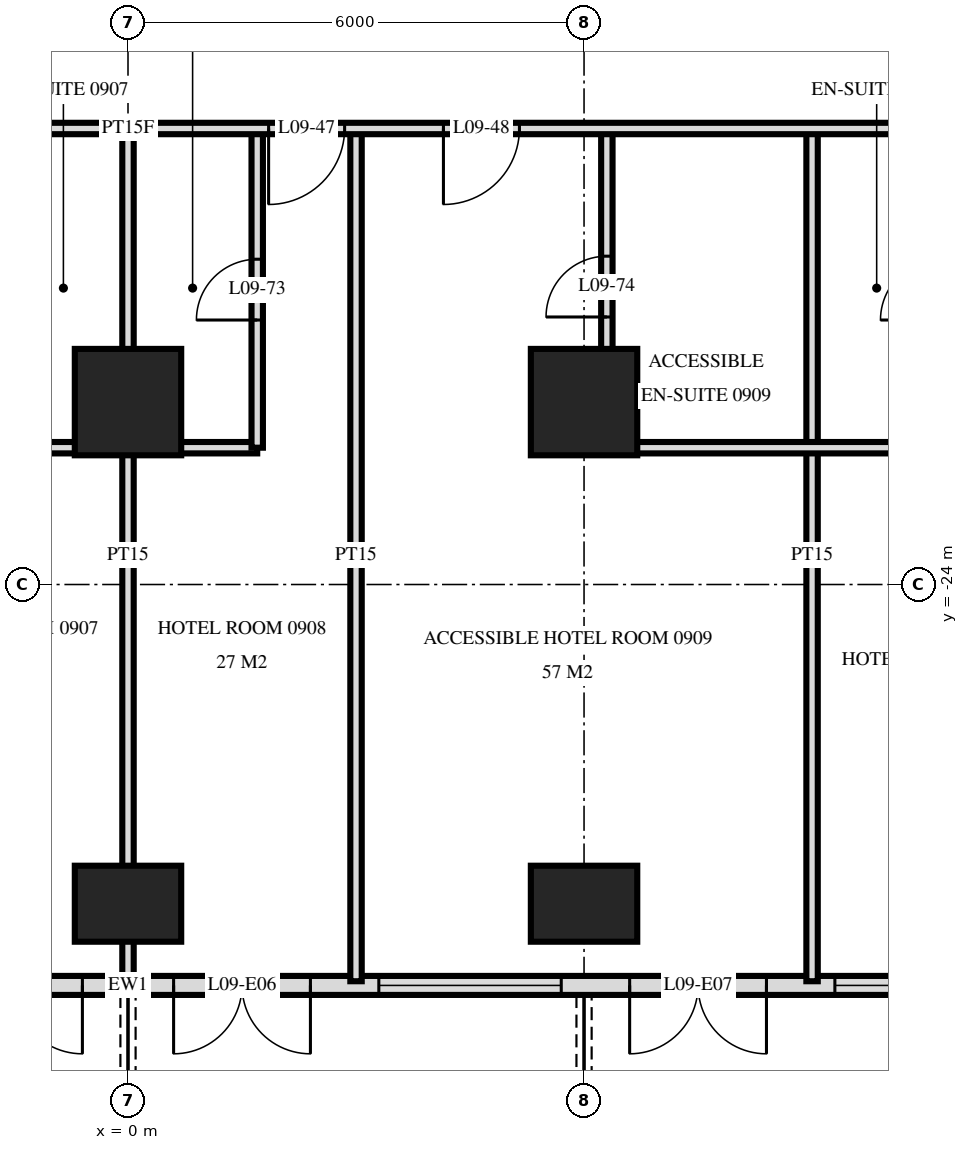
"""IFC4 building model, lengths in metres.
Left out: names, types, materials, properties, quantities, classifications, styles, units other than length and angle.
Written with IfcOpenShell. Run it as: python <this file> out.ifc"""

import sys

from ifc_helpers import new_model, si_unit, direction, frame, frame_2d, origin, origin_2d, place, context, subcontext, project, spatial, rectangle, extrude, element, fill, save


model = new_model("IFC4")
c1 = context("Model", 3, precision=1e-05, world=origin(), true_north=direction((0.0, 1.0)))
c2 = subcontext(c1, "Body", "Model", "MODEL_VIEW")
j1 = project(units=[si_unit("LENGTHUNIT", "METRE"), si_unit("PLANEANGLEUNIT", "RADIAN")], contexts=[c1])
p1 = place(None, origin())
s1 = spatial("IfcSite", under=j1, at=p1, CompositionType="ELEMENT")
p2 = place(p1, origin())
s2 = spatial("IfcBuilding", under=s1, at=p2, CompositionType="ELEMENT")
p3 = place(p2, frame((0.0, 0.0, 42.0)))
s3 = spatial("IfcBuildingStorey", under=s2, at=p3, CompositionType="ELEMENT", Elevation=42.0)
p4 = place(p3, frame((0.0, -28.2, 0.0), z_axis=(0.0, 0.0, 1.0), x_axis=(1.0, 0.0, 0.0)))
e1 = element("IfcColumn", 1, at=p4, inside=s3, PredefinedType="COLUMN", context=c2, shape_type="SweptSolid", body=[
    extrude(rectangle(XDim=1.4, YDim=1.0, at=origin_2d()), origin(), (0.0, 0.0, 1.0), 3.6),
])
p5 = place(p3, frame((0.0, -21.6, 0.0), z_axis=(0.0, 0.0, 1.0), x_axis=(1.0, 0.0, 0.0)))
e2 = element("IfcColumn", 2, at=p5, inside=s3, PredefinedType="COLUMN", context=c2, shape_type="SweptSolid", body=[
    extrude(rectangle(XDim=1.4, YDim=1.4, at=origin_2d()), origin(), (0.0, 0.0, 1.0), 3.6),
])
p6 = place(p3, frame((6.0, -28.2, 0.0), z_axis=(0.0, 0.0, 1.0), x_axis=(1.0, 0.0, 0.0)))
e3 = element("IfcColumn", 3, at=p6, inside=s3, PredefinedType="COLUMN", context=c2, shape_type="SweptSolid", body=[
    extrude(rectangle(XDim=1.4, YDim=1.0, at=origin_2d()), origin(), (0.0, 0.0, 1.0), 3.6),
])
p7 = place(p3, frame((6.0, -21.6, 0.0), z_axis=(0.0, 0.0, 1.0), x_axis=(1.0, 0.0, 0.0)))
e4 = element("IfcColumn", 4, at=p7, inside=s3, PredefinedType="COLUMN", context=c2, shape_type="SweptSolid", body=[
    extrude(rectangle(XDim=1.4, YDim=1.4, at=origin_2d()), origin(), (0.0, 0.0, 1.0), 3.6),
])
p8 = place(p3, frame((-28.775, -29.275, 0.0), z_axis=(0.0, 0.0, 1.0), x_axis=(1.0, 0.0, 0.0)))
e5 = element("IfcWall", 5, at=p8, inside=s3, PredefinedType="SOLIDWALL", context=c2, shape_type="SweptSolid", body=[
    extrude(rectangle(XDim=57.551, YDim=0.25, at=frame_2d((28.775, 0.0))), origin(), (0.0, 0.0, 1.0), 3.32),
])
p9 = place(p8, frame((0.575, 0.0, 0.0)))
e6 = element("IfcOpeningElement", 6, at=p9, cuts=e5, PredefinedType="OPENING", context=c2, shape_type="SweptSolid", body=[
    extrude(rectangle(XDim=1.8, YDim=2.4, at=frame_2d((0.9, 1.2))), frame((0.0, 0.135, 0.0), z_axis=(0.0, -1.0, 0.0), x_axis=(1.0, 0.0, 0.0)), (0.0, 0.0, 1.0), 0.27),
])
p10 = place(p8, frame((5.375, 0.0, 0.0)))
e7 = element("IfcOpeningElement", 7, at=p10, cuts=e5, PredefinedType="OPENING", context=c2, shape_type="SweptSolid", body=[
    extrude(rectangle(XDim=1.8, YDim=2.4, at=frame_2d((0.9, 1.2))), frame((0.0, 0.135, 0.0), z_axis=(0.0, -1.0, 0.0), x_axis=(1.0, 0.0, 0.0)), (0.0, 0.0, 1.0), 0.27),
])
p11 = place(p8, frame((8.075, 0.0, 0.3)))
e8 = element("IfcOpeningElement", 8, at=p11, cuts=e5, PredefinedType="OPENING", context=c2, shape_type="SweptSolid", body=[
    extrude(rectangle(XDim=2.4, YDim=2.1, at=frame_2d((1.2, 1.05))), frame((0.0, 0.135, 0.0), z_axis=(0.0, -1.0, 0.0), x_axis=(1.0, 0.0, 0.0)), (0.0, 0.0, 1.0), 0.27),
])
p12 = place(p8, frame((11.375, 0.0, 0.0)))
e9 = element("IfcOpeningElement", 9, at=p12, cuts=e5, PredefinedType="OPENING", context=c2, shape_type="SweptSolid", body=[
    extrude(rectangle(XDim=1.8, YDim=2.4, at=frame_2d((0.9, 1.2))), frame((0.0, 0.135, 0.0), z_axis=(0.0, -1.0, 0.0), x_axis=(1.0, 0.0, 0.0)), (0.0, 0.0, 1.0), 0.27),
])
p13 = place(p8, frame((14.075, 0.0, 0.3)))
e10 = element("IfcOpeningElement", 10, at=p13, cuts=e5, PredefinedType="OPENING", context=c2, shape_type="SweptSolid", body=[
    extrude(rectangle(XDim=2.4, YDim=2.1, at=frame_2d((1.2, 1.05))), frame((0.0, 0.135, 0.0), z_axis=(0.0, -1.0, 0.0), x_axis=(1.0, 0.0, 0.0)), (0.0, 0.0, 1.0), 0.27),
])
p14 = place(p8, frame((17.375, 0.0, 0.0)))
e11 = element("IfcOpeningElement", 11, at=p14, cuts=e5, PredefinedType="OPENING", context=c2, shape_type="SweptSolid", body=[
    extrude(rectangle(XDim=1.8, YDim=2.4, at=frame_2d((0.9, 1.2))), frame((0.0, 0.135, 0.0), z_axis=(0.0, -1.0, 0.0), x_axis=(1.0, 0.0, 0.0)), (0.0, 0.0, 1.0), 0.27),
])
p15 = place(p8, frame((20.075, 0.0, 0.3)))
e12 = element("IfcOpeningElement", 12, at=p15, cuts=e5, PredefinedType="OPENING", context=c2, shape_type="SweptSolid", body=[
    extrude(rectangle(XDim=2.4, YDim=2.1, at=frame_2d((1.2, 1.05))), frame((0.0, 0.135, 0.0), z_axis=(0.0, -1.0, 0.0), x_axis=(1.0, 0.0, 0.0)), (0.0, 0.0, 1.0), 0.27),
])
p16 = place(p8, frame((23.075, 0.0, 0.3)))
e13 = element("IfcOpeningElement", 13, at=p16, cuts=e5, PredefinedType="OPENING", context=c2, shape_type="SweptSolid", body=[
    extrude(rectangle(XDim=2.4, YDim=2.1, at=frame_2d((1.2, 1.05))), frame((0.0, 0.135, 0.0), z_axis=(0.0, -1.0, 0.0), x_axis=(1.0, 0.0, 0.0)), (0.0, 0.0, 1.0), 0.27),
])
p17 = place(p8, frame((26.375, 0.0, 0.0)))
e14 = element("IfcOpeningElement", 14, at=p17, cuts=e5, PredefinedType="OPENING", context=c2, shape_type="SweptSolid", body=[
    extrude(rectangle(XDim=1.8, YDim=2.4, at=frame_2d((0.9, 1.2))), frame((0.0, 0.135, 0.0), z_axis=(0.0, -1.0, 0.0), x_axis=(1.0, 0.0, 0.0)), (0.0, 0.0, 1.0), 0.27),
])
p18 = place(p8, frame((29.375, 0.0, 0.0)))
e15 = element("IfcOpeningElement", 15, at=p18, cuts=e5, PredefinedType="OPENING", context=c2, shape_type="SweptSolid", body=[
    extrude(rectangle(XDim=1.8, YDim=2.4, at=frame_2d((0.9, 1.2))), frame((0.0, 0.135, 0.0), z_axis=(0.0, -1.0, 0.0), x_axis=(1.0, 0.0, 0.0)), (0.0, 0.0, 1.0), 0.27),
])
p19 = place(p8, frame((32.075, 0.0, 0.3)))
e16 = element("IfcOpeningElement", 16, at=p19, cuts=e5, PredefinedType="OPENING", context=c2, shape_type="SweptSolid", body=[
    extrude(rectangle(XDim=2.4, YDim=2.1, at=frame_2d((1.2, 1.05))), frame((0.0, 0.135, 0.0), z_axis=(0.0, -1.0, 0.0), x_axis=(1.0, 0.0, 0.0)), (0.0, 0.0, 1.0), 0.27),
])
p20 = place(p8, frame((35.375, 0.0, 0.0)))
e17 = element("IfcOpeningElement", 17, at=p20, cuts=e5, PredefinedType="OPENING", context=c2, shape_type="SweptSolid", body=[
    extrude(rectangle(XDim=1.8, YDim=2.4, at=frame_2d((0.9, 1.2))), frame((0.0, 0.135, 0.0), z_axis=(0.0, -1.0, 0.0), x_axis=(1.0, 0.0, 0.0)), (0.0, 0.0, 1.0), 0.27),
])
p21 = place(p8, frame((38.075, 0.0, 0.3)))
e18 = element("IfcOpeningElement", 18, at=p21, cuts=e5, PredefinedType="OPENING", context=c2, shape_type="SweptSolid", body=[
    extrude(rectangle(XDim=2.4, YDim=2.1, at=frame_2d((1.2, 1.05))), frame((0.0, 0.135, 0.0), z_axis=(0.0, -1.0, 0.0), x_axis=(1.0, 0.0, 0.0)), (0.0, 0.0, 1.0), 0.27),
])
p22 = place(p8, frame((41.375, 0.0, 0.0)))
e19 = element("IfcOpeningElement", 19, at=p22, cuts=e5, PredefinedType="OPENING", context=c2, shape_type="SweptSolid", body=[
    extrude(rectangle(XDim=1.8, YDim=2.4, at=frame_2d((0.9, 1.2))), frame((0.0, 0.135, 0.0), z_axis=(0.0, -1.0, 0.0), x_axis=(1.0, 0.0, 0.0)), (0.0, 0.0, 1.0), 0.27),
])
p23 = place(p8, frame((44.075, 0.0, 0.3)))
e20 = element("IfcOpeningElement", 20, at=p23, cuts=e5, PredefinedType="OPENING", context=c2, shape_type="SweptSolid", body=[
    extrude(rectangle(XDim=2.4, YDim=2.1, at=frame_2d((1.2, 1.05))), frame((0.0, 0.135, 0.0), z_axis=(0.0, -1.0, 0.0), x_axis=(1.0, 0.0, 0.0)), (0.0, 0.0, 1.0), 0.27),
])
p24 = place(p8, frame((47.375, 0.0, 0.0)))
e21 = element("IfcOpeningElement", 21, at=p24, cuts=e5, PredefinedType="OPENING", context=c2, shape_type="SweptSolid", body=[
    extrude(rectangle(XDim=1.8, YDim=2.4, at=frame_2d((0.9, 1.2))), frame((0.0, 0.135, 0.0), z_axis=(0.0, -1.0, 0.0), x_axis=(1.0, 0.0, 0.0)), (0.0, 0.0, 1.0), 0.27),
])
p25 = place(p8, frame((50.075, 0.0, 0.3)))
e22 = element("IfcOpeningElement", 22, at=p25, cuts=e5, PredefinedType="OPENING", context=c2, shape_type="SweptSolid", body=[
    extrude(rectangle(XDim=2.4, YDim=2.1, at=frame_2d((1.2, 1.05))), frame((0.0, 0.135, 0.0), z_axis=(0.0, -1.0, 0.0), x_axis=(1.0, 0.0, 0.0)), (0.0, 0.0, 1.0), 0.27),
])
p26 = place(p8, frame((53.375, 0.0, 0.0)))
e23 = element("IfcOpeningElement", 23, at=p26, cuts=e5, PredefinedType="OPENING", context=c2, shape_type="SweptSolid", body=[
    extrude(rectangle(XDim=1.8, YDim=2.4, at=frame_2d((0.9, 1.2))), frame((0.0, 0.135, 0.0), z_axis=(0.0, -1.0, 0.0), x_axis=(1.0, 0.0, 0.0)), (0.0, 0.0, 1.0), 0.27),
])
p27 = place(p3, frame((9.0, -29.22, 0.0), z_axis=(0.0, 0.0, 1.0), x_axis=(0.0, 1.0, 0.0)))
e24 = element("IfcWall", 24, at=p27, inside=s3, PredefinedType="PARTITIONING", context=c2, shape_type="SweptSolid", body=[
    extrude(rectangle(XDim=11.22, YDim=0.15, at=frame_2d((5.61, 0.0))), origin(), (0.0, 0.0, 1.0), 3.32),
])
p28 = place(p3, frame((6.3, -22.2, 0.0), z_axis=(0.0, 0.0, 1.0), x_axis=(0.0, 1.0, 0.0)))
e25 = element("IfcWall", 25, at=p28, inside=s3, PredefinedType="PARTITIONING", context=c2, shape_type="SweptSolid", body=[
    extrude(rectangle(XDim=4.2, YDim=0.15, at=frame_2d((2.1, 0.0))), origin(), (0.0, 0.0, 1.0), 3.32),
])
p29 = place(p28, frame((1.72, 0.0, 0.0)))
e26 = element("IfcOpeningElement", 26, at=p29, cuts=e25, PredefinedType="OPENING", context=c2, shape_type="SweptSolid", body=[
    extrude(rectangle(XDim=0.8, YDim=2.1, at=frame_2d((0.4, 1.05))), frame((0.0, 0.085, 0.0), z_axis=(0.0, -1.0, 0.0), x_axis=(1.0, 0.0, 0.0)), (0.0, 0.0, 1.0), 0.17),
])
p30 = place(p3, frame((3.0, -29.22, 0.0), z_axis=(0.0, 0.0, 1.0), x_axis=(0.0, 1.0, 0.0)))
e27 = element("IfcWall", 27, at=p30, inside=s3, PredefinedType="PARTITIONING", context=c2, shape_type="SweptSolid", body=[
    extrude(rectangle(XDim=11.22, YDim=0.15, at=frame_2d((5.61, 0.0))), origin(), (0.0, 0.0, 1.0), 3.32),
])
p31 = place(p3, frame((1.7, -22.2, 0.0), z_axis=(0.0, 0.0, 1.0), x_axis=(0.0, 1.0, 0.0)))
e28 = element("IfcWall", 28, at=p31, inside=s3, PredefinedType="PARTITIONING", context=c2, shape_type="SweptSolid", body=[
    extrude(rectangle(XDim=4.2, YDim=0.15, at=frame_2d((2.1, 0.0))), origin(), (0.0, 0.0, 1.0), 3.32),
])
p32 = place(p31, frame((1.68, 0.0, 0.0)))
e29 = element("IfcOpeningElement", 29, at=p32, cuts=e28, PredefinedType="OPENING", context=c2, shape_type="SweptSolid", body=[
    extrude(rectangle(XDim=0.8, YDim=2.1, at=frame_2d((0.4, 1.05))), frame((0.0, 0.085, 0.0), z_axis=(0.0, -1.0, 0.0), x_axis=(1.0, 0.0, 0.0)), (0.0, 0.0, 1.0), 0.17),
])
p33 = place(p3, frame((0.0, -29.22, 0.0), z_axis=(0.0, 0.0, 1.0), x_axis=(0.0, 1.0, 0.0)))
e30 = element("IfcWall", 30, at=p33, inside=s3, PredefinedType="PARTITIONING", context=c2, shape_type="SweptSolid", body=[
    extrude(rectangle(XDim=11.22, YDim=0.15, at=frame_2d((5.61, 0.0))), origin(), (0.0, 0.0, 1.0), 3.32),
])
p34 = place(p3, frame((-1.7, -22.2, 0.0), z_axis=(0.0, 0.0, 1.0), x_axis=(1.0, 0.0, 0.0)))
e31 = element("IfcWall", 31, at=p34, inside=s3, PredefinedType="PARTITIONING", context=c2, shape_type="SweptSolid", body=[
    extrude(rectangle(XDim=3.4, YDim=0.15, at=frame_2d((1.7, 0.0))), origin(), (0.0, 0.0, 1.0), 3.32),
])
p35 = place(p3, frame((6.3, -22.2, 0.0), z_axis=(0.0, 0.0, 1.0), x_axis=(1.0, 0.0, 0.0)))
e32 = element("IfcWall", 32, at=p35, inside=s3, PredefinedType="PARTITIONING", context=c2, shape_type="SweptSolid", body=[
    extrude(rectangle(XDim=4.4, YDim=0.15, at=frame_2d((2.2, 0.0))), origin(), (0.0, 0.0, 1.0), 3.32),
])
p36 = place(p3, frame((-33.12, -18.0, 0.0), z_axis=(0.0, 0.0, 1.0), x_axis=(1.0, 0.0, 0.0)))
e33 = element("IfcWall", 33, at=p36, inside=s3, PredefinedType="PARTITIONING", context=c2, shape_type="SweptSolid", body=[
    extrude(rectangle(XDim=66.24, YDim=0.15, at=frame_2d((33.12, 0.0))), origin(), (0.0, 0.0, 1.0), 3.32),
])
p37 = place(p36, frame((12.27, 0.0, 0.0)))
e34 = element("IfcOpeningElement", 34, at=p37, cuts=e33, PredefinedType="OPENING", context=c2, shape_type="SweptSolid", body=[
    extrude(rectangle(XDim=1.0, YDim=2.1, at=frame_2d((0.5, 1.05))), frame((0.0, 0.085, 0.0), z_axis=(0.0, -1.0, 0.0), x_axis=(1.0, 0.0, 0.0)), (0.0, 0.0, 1.0), 0.17),
])
p38 = place(p36, frame((16.97, 0.0, 0.0)))
e35 = element("IfcOpeningElement", 35, at=p38, cuts=e33, PredefinedType="OPENING", context=c2, shape_type="SweptSolid", body=[
    extrude(rectangle(XDim=1.0, YDim=2.1, at=frame_2d((0.5, 1.05))), frame((0.0, 0.085, 0.0), z_axis=(0.0, -1.0, 0.0), x_axis=(1.0, 0.0, 0.0)), (0.0, 0.0, 1.0), 0.17),
])
p39 = place(p36, frame((18.27, 0.0, 0.0)))
e36 = element("IfcOpeningElement", 36, at=p39, cuts=e33, PredefinedType="OPENING", context=c2, shape_type="SweptSolid", body=[
    extrude(rectangle(XDim=1.0, YDim=2.1, at=frame_2d((0.5, 1.05))), frame((0.0, 0.085, 0.0), z_axis=(0.0, -1.0, 0.0), x_axis=(1.0, 0.0, 0.0)), (0.0, 0.0, 1.0), 0.17),
])
p40 = place(p36, frame((22.97, 0.0, 0.0)))
e37 = element("IfcOpeningElement", 37, at=p40, cuts=e33, PredefinedType="OPENING", context=c2, shape_type="SweptSolid", body=[
    extrude(rectangle(XDim=1.0, YDim=2.1, at=frame_2d((0.5, 1.05))), frame((0.0, 0.085, 0.0), z_axis=(0.0, -1.0, 0.0), x_axis=(1.0, 0.0, 0.0)), (0.0, 0.0, 1.0), 0.17),
])
p41 = place(p36, frame((24.27, 0.0, 0.0)))
e38 = element("IfcOpeningElement", 38, at=p41, cuts=e33, PredefinedType="OPENING", context=c2, shape_type="SweptSolid", body=[
    extrude(rectangle(XDim=1.0, YDim=2.1, at=frame_2d((0.5, 1.05))), frame((0.0, 0.085, 0.0), z_axis=(0.0, -1.0, 0.0), x_axis=(1.0, 0.0, 0.0)), (0.0, 0.0, 1.0), 0.17),
])
p42 = place(p36, frame((28.97, 0.0, 0.0)))
e39 = element("IfcOpeningElement", 39, at=p42, cuts=e33, PredefinedType="OPENING", context=c2, shape_type="SweptSolid", body=[
    extrude(rectangle(XDim=1.0, YDim=2.1, at=frame_2d((0.5, 1.05))), frame((0.0, 0.085, 0.0), z_axis=(0.0, -1.0, 0.0), x_axis=(1.0, 0.0, 0.0)), (0.0, 0.0, 1.0), 0.17),
])
p43 = place(p36, frame((30.27, 0.0, 0.0)))
e40 = element("IfcOpeningElement", 40, at=p43, cuts=e33, PredefinedType="OPENING", context=c2, shape_type="SweptSolid", body=[
    extrude(rectangle(XDim=1.0, YDim=2.1, at=frame_2d((0.5, 1.05))), frame((0.0, 0.085, 0.0), z_axis=(0.0, -1.0, 0.0), x_axis=(1.0, 0.0, 0.0)), (0.0, 0.0, 1.0), 0.17),
])
p44 = place(p36, frame((34.97, 0.0, 0.0)))
e41 = element("IfcOpeningElement", 41, at=p44, cuts=e33, PredefinedType="OPENING", context=c2, shape_type="SweptSolid", body=[
    extrude(rectangle(XDim=1.0, YDim=2.1, at=frame_2d((0.5, 1.05))), frame((0.0, 0.085, 0.0), z_axis=(0.0, -1.0, 0.0), x_axis=(1.0, 0.0, 0.0)), (0.0, 0.0, 1.0), 0.17),
])
p45 = place(p36, frame((37.27, 0.0, 0.0)))
e42 = element("IfcOpeningElement", 42, at=p45, cuts=e33, PredefinedType="OPENING", context=c2, shape_type="SweptSolid", body=[
    extrude(rectangle(XDim=1.0, YDim=2.1, at=frame_2d((0.5, 1.05))), frame((0.0, 0.085, 0.0), z_axis=(0.0, -1.0, 0.0), x_axis=(1.0, 0.0, 0.0)), (0.0, 0.0, 1.0), 0.17),
])
p46 = place(p36, frame((43.97, 0.0, 0.0)))
e43 = element("IfcOpeningElement", 43, at=p46, cuts=e33, PredefinedType="OPENING", context=c2, shape_type="SweptSolid", body=[
    extrude(rectangle(XDim=1.0, YDim=2.1, at=frame_2d((0.5, 1.05))), frame((0.0, 0.085, 0.0), z_axis=(0.0, -1.0, 0.0), x_axis=(1.0, 0.0, 0.0)), (0.0, 0.0, 1.0), 0.17),
])
p47 = place(p36, frame((45.27, 0.0, 0.0)))
e44 = element("IfcOpeningElement", 44, at=p47, cuts=e33, PredefinedType="OPENING", context=c2, shape_type="SweptSolid", body=[
    extrude(rectangle(XDim=1.0, YDim=2.1, at=frame_2d((0.5, 1.05))), frame((0.0, 0.085, 0.0), z_axis=(0.0, -1.0, 0.0), x_axis=(1.0, 0.0, 0.0)), (0.0, 0.0, 1.0), 0.17),
])
p48 = place(p36, frame((51.22, 0.0, 0.0)))
e45 = element("IfcOpeningElement", 45, at=p48, cuts=e33, PredefinedType="OPENING", context=c2, shape_type="SweptSolid", body=[
    extrude(rectangle(XDim=1.0, YDim=2.1, at=frame_2d((0.5, 1.05))), frame((0.0, 0.085, 0.0), z_axis=(0.0, -1.0, 0.0), x_axis=(1.0, 0.0, 0.0)), (0.0, 0.0, 1.0), 0.17),
])
p49 = place(p36, frame((54.27, 0.0, 0.0)))
e46 = element("IfcOpeningElement", 46, at=p49, cuts=e33, PredefinedType="OPENING", context=c2, shape_type="SweptSolid", body=[
    extrude(rectangle(XDim=1.0, YDim=2.1, at=frame_2d((0.5, 1.05))), frame((0.0, 0.085, 0.0), z_axis=(0.0, -1.0, 0.0), x_axis=(1.0, 0.0, 0.0)), (0.0, 0.0, 1.0), 0.17),
])
p50 = place(p36, frame((6.07, 0.0, 0.0)))
e47 = element("IfcOpeningElement", 47, at=p50, cuts=e33, PredefinedType="OPENING", context=c2, shape_type="SweptSolid", body=[
    extrude(rectangle(XDim=1.0, YDim=2.1, at=frame_2d((0.5, 1.05))), frame((0.0, 0.085, 0.0), z_axis=(0.0, -1.0, 0.0), x_axis=(1.0, 0.0, 0.0)), (0.0, 0.0, 1.0), 0.17),
])
p51 = place(p36, frame((63.37, 0.0, 0.0)))
e48 = element("IfcOpeningElement", 48, at=p51, cuts=e33, PredefinedType="OPENING", context=c2, shape_type="SweptSolid", body=[
    extrude(rectangle(XDim=1.0, YDim=2.1, at=frame_2d((0.5, 1.05))), frame((0.0, 0.085, 0.0), z_axis=(0.0, -1.0, 0.0), x_axis=(1.0, 0.0, 0.0)), (0.0, 0.0, 1.0), 0.17),
])
p52 = place(p17, frame((0.9, 0.0, 0.0), z_axis=(0.0, 0.0, 1.0), x_axis=(-1.0, 0.0, 0.0)))
e49 = element("IfcDoor", 49, at=p52, inside=s3, OperationType="DOUBLE_DOOR_SINGLE_SWING", PredefinedType="DOOR", context=c2, shape_type="SweptSolid", body=[
    extrude(rectangle(XDim=1.8, YDim=2.4, at=frame_2d((0.0, 1.2))), frame((0.0, -0.025, 0.0), z_axis=(0.0, 1.0, 0.0), x_axis=(-1.0, 0.0, 0.0)), (0.0, 0.0, 1.0), 0.05),
])
fill(e14, e49)
p53 = place(p18, frame((0.9, 0.0, 0.0), z_axis=(0.0, 0.0, 1.0), x_axis=(-1.0, 0.0, 0.0)))
e50 = element("IfcDoor", 50, at=p53, inside=s3, OperationType="DOUBLE_DOOR_SINGLE_SWING", PredefinedType="DOOR", context=c2, shape_type="SweptSolid", body=[
    extrude(rectangle(XDim=1.8, YDim=2.4, at=frame_2d((0.0, 1.2))), frame((0.0, -0.025, 0.0), z_axis=(0.0, 1.0, 0.0), x_axis=(-1.0, 0.0, 0.0)), (0.0, 0.0, 1.0), 0.05),
])
fill(e15, e50)
p54 = place(p19, origin())
e51 = element("IfcWindow", 51, at=p54, inside=s3, PartitioningType="SINGLE_PANEL", PredefinedType="WINDOW", context=c2, shape_type="SweptSolid", body=[
    extrude(rectangle(XDim=2.4, YDim=2.1, at=frame_2d((1.2, 1.05))), frame((0.0, 0.03, 0.0), z_axis=(0.0, -1.0, 0.0), x_axis=(1.0, 0.0, 0.0)), (0.0, 0.0, 1.0), 0.06),
])
fill(e16, e51)
p55 = place(p20, frame((0.9, 0.0, 0.0), z_axis=(0.0, 0.0, 1.0), x_axis=(-1.0, 0.0, 0.0)))
e52 = element("IfcDoor", 52, at=p55, inside=s3, OperationType="DOUBLE_DOOR_SINGLE_SWING", PredefinedType="DOOR", context=c2, shape_type="SweptSolid", body=[
    extrude(rectangle(XDim=1.8, YDim=2.4, at=frame_2d((0.0, 1.2))), frame((0.0, -0.025, 0.0), z_axis=(0.0, 1.0, 0.0), x_axis=(-1.0, 0.0, 0.0)), (0.0, 0.0, 1.0), 0.05),
])
fill(e17, e52)
p56 = place(p21, origin())
e53 = element("IfcWindow", 53, at=p56, inside=s3, PartitioningType="SINGLE_PANEL", PredefinedType="WINDOW", context=c2, shape_type="SweptSolid", body=[
    extrude(rectangle(XDim=2.4, YDim=2.1, at=frame_2d((1.2, 1.05))), frame((0.0, 0.03, 0.0), z_axis=(0.0, -1.0, 0.0), x_axis=(1.0, 0.0, 0.0)), (0.0, 0.0, 1.0), 0.06),
])
fill(e18, e53)
p57 = place(p44, frame((0.5, 0.0, 0.0), z_axis=(0.0, 0.0, 1.0), x_axis=(-1.0, 0.0, 0.0)))
e54 = element("IfcDoor", 54, at=p57, inside=s3, OperationType="SINGLE_SWING_LEFT", PredefinedType="DOOR", context=c2, shape_type="SweptSolid", body=[
    extrude(rectangle(XDim=1.0, YDim=2.1, at=frame_2d((0.0, 1.05))), frame((0.0, -0.025, 0.0), z_axis=(0.0, 1.0, 0.0), x_axis=(-1.0, 0.0, 0.0)), (0.0, 0.0, 1.0), 0.05),
])
fill(e41, e54)
p58 = place(p45, frame((0.5, 0.0, 0.0), z_axis=(0.0, 0.0, 1.0), x_axis=(-1.0, 0.0, 0.0)))
e55 = element("IfcDoor", 55, at=p58, inside=s3, OperationType="SINGLE_SWING_LEFT", PredefinedType="DOOR", context=c2, shape_type="SweptSolid", body=[
    extrude(rectangle(XDim=1.0, YDim=2.1, at=frame_2d((0.0, 1.05))), frame((0.0, -0.025, 0.0), z_axis=(0.0, 1.0, 0.0), x_axis=(-1.0, 0.0, 0.0)), (0.0, 0.0, 1.0), 0.05),
])
fill(e42, e55)
p59 = place(p32, origin())
e56 = element("IfcDoor", 56, at=p59, inside=s3, OperationType="SINGLE_SWING_RIGHT", PredefinedType="DOOR", context=c2, shape_type="SweptSolid", body=[
    extrude(rectangle(XDim=0.8, YDim=2.1, at=frame_2d((0.4, 1.05))), frame((0.0, 0.025, 0.0), z_axis=(0.0, -1.0, 0.0), x_axis=(1.0, 0.0, 0.0)), (0.0, 0.0, 1.0), 0.05),
])
fill(e29, e56)
p60 = place(p29, origin())
e57 = element("IfcDoor", 57, at=p60, inside=s3, OperationType="SINGLE_SWING_RIGHT", PredefinedType="DOOR", context=c2, shape_type="SweptSolid", body=[
    extrude(rectangle(XDim=0.8, YDim=2.1, at=frame_2d((0.4, 1.05))), frame((0.0, 0.025, 0.0), z_axis=(0.0, -1.0, 0.0), x_axis=(1.0, 0.0, 0.0)), (0.0, 0.0, 1.0), 0.05),
])
fill(e26, e57)
save(model, sys.argv[1])
